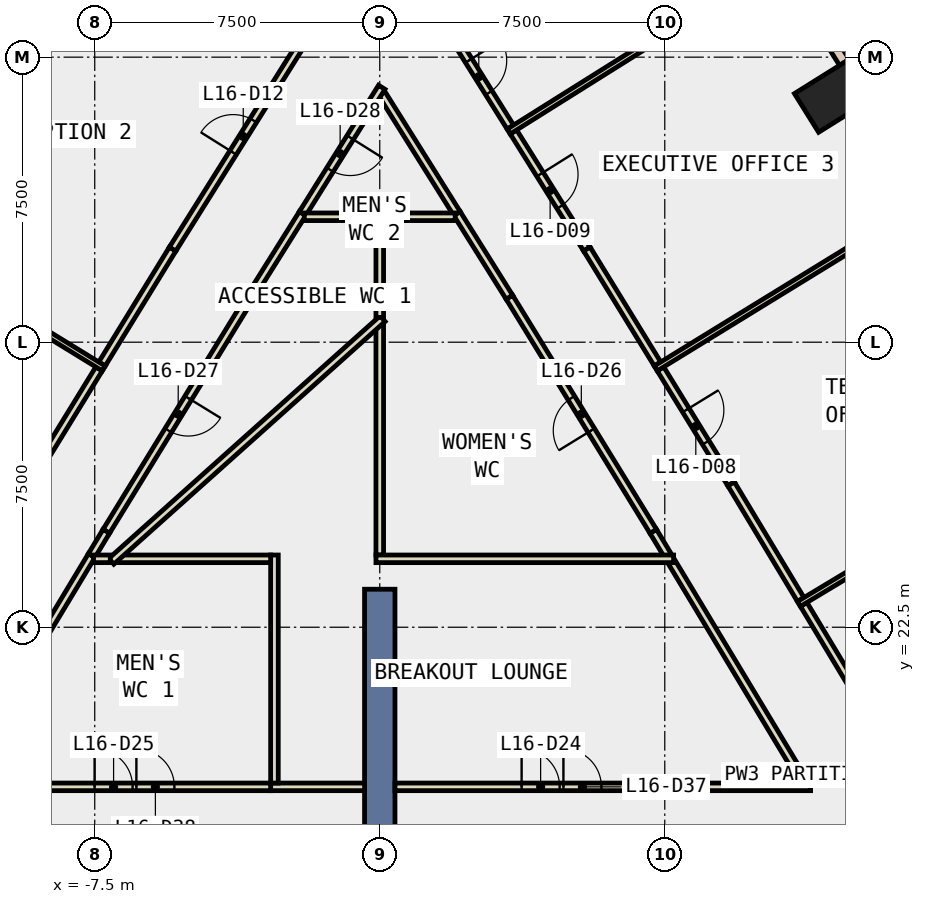
"""IFC4 building model, lengths in metres.
Left out: names, types, materials, properties, quantities, classifications, styles, units other than length and angle.
Written with IfcOpenShell. Run it as: python <this file> out.ifc"""

import sys

from ifc_helpers import new_model, si_unit, direction, frame, frame_2d, origin, origin_2d, place, context, subcontext, project, spatial, rectangle, extrude, element, fill, save


model = new_model("IFC4")
c1 = context("Model", 3, precision=1e-05, world=origin(), true_north=direction((0.0, 1.0)))
c2 = subcontext(c1, "Body", "Model", "MODEL_VIEW")
j1 = project(units=[si_unit("LENGTHUNIT", "METRE"), si_unit("PLANEANGLEUNIT", "RADIAN")], contexts=[c1])
p1 = place(None, origin())
s1 = spatial("IfcSite", under=j1, at=p1, CompositionType="ELEMENT")
p2 = place(p1, origin())
s2 = spatial("IfcBuilding", under=s1, at=p2, CompositionType="ELEMENT")
p3 = place(p2, frame((0.0, 0.0, 77.0)))
s3 = spatial("IfcBuildingStorey", under=s2, at=p3, CompositionType="ELEMENT", Elevation=77.0)
p4 = place(p3, frame((11.909, 36.457, -0.4), z_axis=(0.0, 0.0, 1.0), x_axis=(-0.530067268476, 0.847955594881, 0.0)))
e1 = element("IfcColumn", 1, at=p4, inside=s3, PredefinedType="COLUMN", context=c2, shape_type="SweptSolid", body=[
    extrude(rectangle(XDim=1.2, YDim=1.6, at=origin_2d()), origin(), (0.0, 0.0, 1.0), 4.0),
])
p5 = place(p3, frame((0.0, 14.5, -0.4), z_axis=(0.0, 0.0, 1.0), x_axis=(0.0, 1.0, 0.0)))
e2 = element("IfcWall", 2, at=p5, inside=s3, PredefinedType="SHEAR", context=c2, shape_type="SweptSolid", body=[
    extrude(rectangle(XDim=9.0, YDim=0.8, at=frame_2d((4.5, 0.0))), origin(), (0.0, 0.0, 1.0), 4.0),
])
p6 = place(p3, frame((12.227, 37.362, 0.0), z_axis=(0.0, 0.0, 1.0), x_axis=(-0.531357111884, 0.847147932565, 0.0)))
e3 = element("IfcWall", 3, at=p6, inside=s3, PredefinedType="STANDARD", context=c2, shape_type="SweptSolid", body=[
    extrude(rectangle(XDim=6.282, YDim=0.3, at=frame_2d((3.141, 0.0))), origin(), (0.0, 0.0, 1.0), 3.6),
])
p7 = place(p6, frame((0.571, 0.0, 0.9)))
e4 = element("IfcOpeningElement", 4, at=p7, cuts=e3, PredefinedType="OPENING", context=c2, shape_type="SweptSolid", body=[
    extrude(rectangle(XDim=2.0, YDim=2.6, at=frame_2d((1.0, 1.3))), frame((0.0, 0.16, 0.0), z_axis=(0.0, -1.0, 0.0), x_axis=(1.0, 0.0, 0.0)), (0.0, 0.0, 1.0), 0.32),
])
p8 = place(p6, frame((3.712, 0.0, 0.9)))
e5 = element("IfcOpeningElement", 5, at=p8, cuts=e3, PredefinedType="OPENING", context=c2, shape_type="SweptSolid", body=[
    extrude(rectangle(XDim=2.0, YDim=2.6, at=frame_2d((1.0, 1.3))), frame((0.0, 0.16, 0.0), z_axis=(0.0, -1.0, 0.0), x_axis=(1.0, 0.0, 0.0)), (0.0, 0.0, 1.0), 0.32),
])
p9 = place(p3, frame((11.186, 18.386, 0.0), z_axis=(0.0, 0.0, 1.0), x_axis=(-0.507247363226, 0.861800506208, 0.0)))
e6 = element("IfcWall", 6, at=p9, inside=s3, PredefinedType="PARTITIONING", context=c2, shape_type="SweptSolid", body=[
    extrude(rectangle(XDim=0.516, YDim=0.2, at=frame_2d((0.258, 0.0))), origin(), (0.0, 0.0, 1.0), 3.6),
])
p10 = place(p3, frame((10.924, 18.831, 0.0), z_axis=(0.0, 0.0, 1.0), x_axis=(-0.515797941416, 0.856710268195, 0.0)))
e7 = element("IfcWall", 7, at=p10, inside=s3, PredefinedType="PARTITIONING", context=c2, shape_type="SweptSolid", body=[
    extrude(rectangle(XDim=6.283, YDim=0.2, at=frame_2d((3.142, 0.0))), origin(), (0.0, 0.0, 1.0), 3.6),
])
p11 = place(p3, frame((-7.58, 24.386, 0.0), z_axis=(0.0, 0.0, 1.0), x_axis=(-0.51574664882, -0.85674114774, 0.0)))
e8 = element("IfcWall", 8, at=p11, inside=s3, PredefinedType="PARTITIONING", context=c2, shape_type="SweptSolid", body=[
    extrude(rectangle(XDim=6.484, YDim=0.2, at=frame_2d((3.242, 0.0))), origin(), (0.0, 0.0, 1.0), 3.6),
])
p12 = place(p3, frame((7.58, 24.386, 0.0), z_axis=(0.0, 0.0, 1.0), x_axis=(-0.515748848873, 0.856739823334, 0.0)))
e9 = element("IfcWall", 9, at=p12, inside=s3, PredefinedType="PARTITIONING", context=c2, shape_type="SweptSolid", body=[
    extrude(rectangle(XDim=0.745, YDim=0.2, at=frame_2d((0.372, 0.0))), origin(), (0.0, 0.0, 1.0), 3.6),
])
p13 = place(p3, frame((7.196, 25.024, 0.0), z_axis=(0.0, 0.0, 1.0), x_axis=(-0.523464329994, 0.852047589765, 0.0)))
e10 = element("IfcWall", 10, at=p13, inside=s3, PredefinedType="PARTITIONING", context=c2, shape_type="SweptSolid", body=[
    extrude(rectangle(XDim=7.231, YDim=0.2, at=frame_2d((3.615, 0.0))), origin(), (0.0, 0.0, 1.0), 3.6),
])
p14 = place(p13, frame((3.115, 0.0, 0.0)))
e11 = element("IfcOpeningElement", 11, at=p14, cuts=e10, PredefinedType="OPENING", context=c2, shape_type="SweptSolid", body=[
    extrude(rectangle(XDim=1.0, YDim=2.1, at=frame_2d((0.5, 1.05))), frame((0.0, 0.11, 0.0), z_axis=(0.0, -1.0, 0.0), x_axis=(1.0, 0.0, 0.0)), (0.0, 0.0, 1.0), 0.22),
])
for number, where, z_axis, x_axis in (
    (12, (3.411, 31.185, 0.0), (0.0, 0.0, 1.0), (-0.531, 0.847, 0.0)),
    (13, (-2.031, 33.385, 0.0), (0.0, 0.0, 1.0), (-0.531, -0.847, 0.0)),
):
    element("IfcWall", number, at=place(p3, frame(where, z_axis=z_axis, x_axis=x_axis)), inside=s3, PredefinedType="PARTITIONING", context=c2, shape_type="SweptSolid", body=[
        extrude(rectangle(XDim=2.597, YDim=0.2, at=frame_2d((1.298, 0.0))), origin(), (0.0, 0.0, 1.0), 3.6),
    ])
p15 = place(p3, frame((-3.411, 31.185, 0.0), z_axis=(0.0, 0.0, 1.0), x_axis=(-0.523464329994, -0.852047589765, 0.0)))
e14 = element("IfcWall", 14, at=p15, inside=s3, PredefinedType="PARTITIONING", context=c2, shape_type="SweptSolid", body=[
    extrude(rectangle(XDim=7.231, YDim=0.2, at=frame_2d((3.615, 0.0))), origin(), (0.0, 0.0, 1.0), 3.6),
])
p16 = place(p15, frame((3.115, 0.0, 0.0)))
e15 = element("IfcOpeningElement", 15, at=p16, cuts=e14, PredefinedType="OPENING", context=c2, shape_type="SweptSolid", body=[
    extrude(rectangle(XDim=1.0, YDim=2.1, at=frame_2d((0.5, 1.05))), frame((0.0, 0.11, 0.0), z_axis=(0.0, -1.0, 0.0), x_axis=(1.0, 0.0, 0.0)), (0.0, 0.0, 1.0), 0.22),
])
p17 = place(p3, frame((-7.196, 25.024, 0.0), z_axis=(0.0, 0.0, 1.0), x_axis=(-0.515748848873, -0.856739823334, 0.0)))
e16 = element("IfcWall", 16, at=p17, inside=s3, PredefinedType="PARTITIONING", context=c2, shape_type="SweptSolid", body=[
    extrude(rectangle(XDim=0.745, YDim=0.2, at=frame_2d((0.372, 0.0))), origin(), (0.0, 0.0, 1.0), 3.6),
])
p18 = place(p3, frame((2.031, 33.385, 0.0), z_axis=(0.0, 0.0, 1.0), x_axis=(-0.53130100335, 0.847183122967, 0.0)))
e17 = element("IfcWall", 17, at=p18, inside=s3, PredefinedType="PARTITIONING", context=c2, shape_type="SweptSolid", body=[
    extrude(rectangle(XDim=3.723, YDim=0.2, at=frame_2d((1.861, 0.0))), origin(), (0.0, 0.0, 1.0), 3.6),
])
p19 = place(p3, frame((0.053, 36.708, 0.0), z_axis=(0.0, 0.0, 1.0), x_axis=(-0.53130190932, -0.847182554797, 0.0)))
e18 = element("IfcWall", 18, at=p19, inside=s3, PredefinedType="PARTITIONING", context=c2, shape_type="SweptSolid", body=[
    extrude(rectangle(XDim=3.922, YDim=0.2, at=frame_2d((1.961, 0.0))), origin(), (0.0, 0.0, 1.0), 3.6),
])
p20 = place(p19, frame((1.562, 0.0, 0.0)))
e19 = element("IfcOpeningElement", 19, at=p20, cuts=e18, PredefinedType="OPENING", context=c2, shape_type="SweptSolid", body=[
    extrude(rectangle(XDim=1.0, YDim=2.1, at=frame_2d((0.5, 1.05))), frame((0.0, 0.11, 0.0), z_axis=(0.0, -1.0, 0.0), x_axis=(1.0, 0.0, 0.0)), (0.0, 0.0, 1.0), 0.22),
])
p21 = place(p3, frame((11.156, 23.1, 0.0), z_axis=(0.0, 0.0, 1.0), x_axis=(0.515628270719, -0.856812398623, 0.0)))
e20 = element("IfcWall", 20, at=p21, inside=s3, PredefinedType="PARTITIONING", context=c2, shape_type="SweptSolid", body=[
    extrude(rectangle(XDim=3.549, YDim=0.2, at=frame_2d((1.775, 0.0))), origin(), (0.0, 0.0, 1.0), 3.6),
])
p22 = place(p3, frame((7.387, 29.298, 0.0), z_axis=(0.0, 0.0, 1.0), x_axis=(0.523341833043, -0.852122834917, 0.0)))
e21 = element("IfcWall", 21, at=p22, inside=s3, PredefinedType="PARTITIONING", context=c2, shape_type="SweptSolid", body=[
    extrude(rectangle(XDim=3.552, YDim=0.2, at=frame_2d((1.776, 0.0))), origin(), (0.0, 0.0, 1.0), 3.6),
])
p23 = place(p22, frame((1.276, 0.0, 0.0)))
e22 = element("IfcOpeningElement", 22, at=p23, cuts=e21, PredefinedType="OPENING", context=c2, shape_type="SweptSolid", body=[
    extrude(rectangle(XDim=1.0, YDim=2.1, at=frame_2d((0.5, 1.05))), frame((0.0, 0.11, 0.0), z_axis=(0.0, -1.0, 0.0), x_axis=(1.0, 0.0, 0.0)), (0.0, 0.0, 1.0), 0.22),
])
p24 = place(p3, frame((9.246, 26.271, 0.0), z_axis=(0.0, 0.0, 1.0), x_axis=(0.515738557296, -0.856746018677, 0.0)))
e23 = element("IfcWall", 23, at=p24, inside=s3, PredefinedType="PARTITIONING", context=c2, shape_type="SweptSolid", body=[
    extrude(rectangle(XDim=3.552, YDim=0.2, at=frame_2d((1.776, 0.0))), origin(), (0.0, 0.0, 1.0), 3.6),
])
p25 = place(p3, frame((3.517, 35.533, 0.0), z_axis=(0.0, 0.0, 1.0), x_axis=(0.531301282969, -0.847182947607, 0.0)))
e24 = element("IfcWall", 24, at=p25, inside=s3, PredefinedType="PARTITIONING", context=c2, shape_type="SweptSolid", body=[
    extrude(rectangle(XDim=3.638, YDim=0.2, at=frame_2d((1.819, 0.0))), origin(), (0.0, 0.0, 1.0), 3.6),
])
p26 = place(p25, frame((1.319, 0.0, 0.0)))
e25 = element("IfcOpeningElement", 25, at=p26, cuts=e24, PredefinedType="OPENING", context=c2, shape_type="SweptSolid", body=[
    extrude(rectangle(XDim=1.0, YDim=2.1, at=frame_2d((0.5, 1.05))), frame((0.0, 0.11, 0.0), z_axis=(0.0, -1.0, 0.0), x_axis=(1.0, 0.0, 0.0)), (0.0, 0.0, 1.0), 0.22),
])
p27 = place(p3, frame((5.45, 32.451, 0.0), z_axis=(0.0, 0.0, 1.0), x_axis=(0.523617783711, -0.851953294836, 0.0)))
e26 = element("IfcWall", 26, at=p27, inside=s3, PredefinedType="PARTITIONING", context=c2, shape_type="SweptSolid", body=[
    extrude(rectangle(XDim=3.551, YDim=0.2, at=frame_2d((1.775, 0.0))), origin(), (0.0, 0.0, 1.0), 3.6),
])
p28 = place(p3, frame((1.775, 38.31, 0.0), z_axis=(0.0, 0.0, 1.0), x_axis=(0.531324164807, -0.847168597088, 0.0)))
e27 = element("IfcWall", 27, at=p28, inside=s3, PredefinedType="PARTITIONING", context=c2, shape_type="SweptSolid", body=[
    extrude(rectangle(XDim=3.128, YDim=0.2, at=frame_2d((1.564, 0.0))), origin(), (0.0, 0.0, 1.0), 3.6),
])
p29 = place(p28, frame((1.064, 0.0, 0.0)))
e28 = element("IfcOpeningElement", 28, at=p29, cuts=e27, PredefinedType="OPENING", context=c2, shape_type="SweptSolid", body=[
    extrude(rectangle(XDim=1.0, YDim=2.1, at=frame_2d((0.5, 1.05))), frame((0.0, 0.11, 0.0), z_axis=(0.0, -1.0, 0.0), x_axis=(1.0, 0.0, 0.0)), (0.0, 0.0, 1.0), 0.22),
])
p30 = place(p3, frame((-7.309, 29.426, 0.0), z_axis=(0.0, 0.0, 1.0), x_axis=(0.523617783711, 0.851953294836, 0.0)))
e29 = element("IfcWall", 29, at=p30, inside=s3, PredefinedType="PARTITIONING", context=c2, shape_type="SweptSolid", body=[
    extrude(rectangle(XDim=3.551, YDim=0.2, at=frame_2d((1.775, 0.0))), origin(), (0.0, 0.0, 1.0), 3.6),
])
p31 = place(p3, frame((-5.45, 32.451, 0.0), z_axis=(0.0, 0.0, 1.0), x_axis=(0.531388870359, 0.847128011849, 0.0)))
e30 = element("IfcWall", 30, at=p31, inside=s3, PredefinedType="PARTITIONING", context=c2, shape_type="SweptSolid", body=[
    extrude(rectangle(XDim=6.991, YDim=0.2, at=frame_2d((3.495, 0.0))), origin(), (0.0, 0.0, 1.0), 3.6),
])
p32 = place(p31, frame((2.996, 0.0, 0.0)))
e31 = element("IfcOpeningElement", 31, at=p32, cuts=e30, PredefinedType="OPENING", context=c2, shape_type="SweptSolid", body=[
    extrude(rectangle(XDim=1.0, YDim=2.1, at=frame_2d((0.5, 1.05))), frame((0.0, 0.11, 0.0), z_axis=(0.0, -1.0, 0.0), x_axis=(1.0, 0.0, 0.0)), (0.0, 0.0, 1.0), 0.22),
])
p33 = place(p3, frame((-9.246, 26.271, 0.0), z_axis=(0.0, 0.0, 1.0), x_axis=(0.523341833043, 0.852122834917, 0.0)))
e32 = element("IfcWall", 32, at=p33, inside=s3, PredefinedType="PARTITIONING", context=c2, shape_type="SweptSolid", body=[
    extrude(rectangle(XDim=3.552, YDim=0.2, at=frame_2d((1.776, 0.0))), origin(), (0.0, 0.0, 1.0), 3.6),
])
p34 = place(p3, frame((-2.871, 18.3, 0.0), z_axis=(0.0, 0.0, 1.0), x_axis=(1.0, 0.0, 0.0)))
e33 = element("IfcWall", 33, at=p34, inside=s3, PredefinedType="PARTITIONING", context=c2, shape_type="SweptSolid", body=[
    extrude(rectangle(XDim=2.471, YDim=0.2, at=frame_2d((1.236, 0.0))), origin(), (0.0, 0.0, 1.0), 3.6),
])
p35 = place(p3, frame((-11.337, 18.3, 0.0), z_axis=(0.0, 0.0, 1.0), x_axis=(1.0, 0.0, 0.0)))
e34 = element("IfcWall", 34, at=p35, inside=s3, PredefinedType="PARTITIONING", context=c2, shape_type="SweptSolid", body=[
    extrude(rectangle(XDim=8.466, YDim=0.2, at=frame_2d((4.233, 0.0))), origin(), (0.0, 0.0, 1.0), 3.6),
])
p36 = place(p35, frame((3.833, 0.0, 0.0)))
e35 = element("IfcOpeningElement", 35, at=p36, cuts=e34, PredefinedType="OPENING", context=c2, shape_type="SweptSolid", body=[
    extrude(rectangle(XDim=1.0, YDim=2.1, at=frame_2d((0.5, 1.05))), frame((0.0, 0.11, 0.0), z_axis=(0.0, -1.0, 0.0), x_axis=(1.0, 0.0, 0.0)), (0.0, 0.0, 1.0), 0.22),
])
p37 = place(p35, frame((4.933, 0.0, 0.0)))
e36 = element("IfcOpeningElement", 36, at=p37, cuts=e34, PredefinedType="OPENING", context=c2, shape_type="SweptSolid", body=[
    extrude(rectangle(XDim=1.0, YDim=2.1, at=frame_2d((0.5, 1.05))), frame((0.0, 0.11, 0.0), z_axis=(0.0, -1.0, 0.0), x_axis=(1.0, 0.0, 0.0)), (0.0, 0.0, 1.0), 0.22),
])
p38 = place(p3, frame((-2.771, 18.4, 0.0), z_axis=(0.0, 0.0, 1.0), x_axis=(0.0, 1.0, 0.0)))
e37 = element("IfcWall", 37, at=p38, inside=s3, PredefinedType="PARTITIONING", context=c2, shape_type="SweptSolid", body=[
    extrude(rectangle(XDim=6.0, YDim=0.2, at=frame_2d((3.0, 0.0))), origin(), (0.0, 0.0, 1.0), 3.6),
])
p39 = place(p3, frame((-2.871, 24.3, 0.0), z_axis=(0.0, 0.0, 1.0), x_axis=(-1.0, 0.0, 0.0)))
e38 = element("IfcWall", 38, at=p39, inside=s3, PredefinedType="PARTITIONING", context=c2, shape_type="SweptSolid", body=[
    extrude(rectangle(XDim=4.02, YDim=0.2, at=frame_2d((2.01, 0.0))), origin(), (0.0, 0.0, 1.0), 3.6),
])
p40 = place(p3, frame((0.0, 30.452, 0.0), z_axis=(0.0, 0.0, 1.0), x_axis=(0.0, -1.0, 0.0)))
e39 = element("IfcWall", 39, at=p40, inside=s3, PredefinedType="PARTITIONING", context=c2, shape_type="SweptSolid", body=[
    extrude(rectangle(XDim=6.052, YDim=0.2, at=frame_2d((3.026, 0.0))), origin(), (0.0, 0.0, 1.0), 3.6),
])
p41 = place(p3, frame((-0.1, 24.3, 0.0), z_axis=(0.0, 0.0, 1.0), x_axis=(1.0, 0.0, 0.0)))
e40 = element("IfcWall", 40, at=p41, inside=s3, PredefinedType="PARTITIONING", context=c2, shape_type="SweptSolid", body=[
    extrude(rectangle(XDim=7.832, YDim=0.2, at=frame_2d((3.916, 0.0))), origin(), (0.0, 0.0, 1.0), 3.6),
])
p42 = place(p3, frame((-7.065, 24.233, 0.0), z_axis=(0.0, 0.0, 1.0), x_axis=(0.745362618546, 0.666659258448, 0.0)))
e41 = element("IfcWall", 41, at=p42, inside=s3, PredefinedType="PARTITIONING", context=c2, shape_type="SweptSolid", body=[
    extrude(rectangle(XDim=9.579, YDim=0.2, at=frame_2d((4.79, 0.0))), origin(), (0.0, 0.0, 1.0), 3.6),
])
p43 = place(p3, frame((-7.532, 24.3, 0.0), z_axis=(0.0, 0.0, 1.0), x_axis=(1.0, 0.0, 0.0)))
e42 = element("IfcWall", 42, at=p43, inside=s3, PredefinedType="PARTITIONING", context=c2, shape_type="SweptSolid", body=[
    extrude(rectangle(XDim=0.441, YDim=0.2, at=frame_2d((0.22, 0.0))), origin(), (0.0, 0.0, 1.0), 3.6),
])
p44 = place(p3, frame((0.0, 30.652, 0.0), z_axis=(0.0, 0.0, 1.0), x_axis=(0.0, 1.0, 0.0)))
e43 = element("IfcWall", 43, at=p44, inside=s3, PredefinedType="PARTITIONING", context=c2, shape_type="SweptSolid", body=[
    extrude(rectangle(XDim=2.748, YDim=0.2, at=frame_2d((1.374, 0.0))), origin(), (0.0, 0.0, 1.0), 3.6),
])
for number, where, z_axis, x_axis in (
    (44, (0.1, 33.3, 0.0), (0.0, 0.0, 1.0), (1.0, 0.0, 0.0)),
    (45, (-1.985, 33.3, 0.0), (0.0, 0.0, 1.0), (1.0, 0.0, 0.0)),
):
    element("IfcWall", number, at=place(p3, frame(where, z_axis=z_axis, x_axis=x_axis)), inside=s3, PredefinedType="PARTITIONING", context=c2, shape_type="SweptSolid", body=[
        extrude(rectangle(XDim=1.885, YDim=0.2, at=frame_2d((0.942, 0.0))), origin(), (0.0, 0.0, 1.0), 3.6),
    ])
p45 = place(p3, frame((11.031, 23.113, 0.0), z_axis=(0.0, 0.0, 1.0), x_axis=(0.856780947164, 0.515680529568, 0.0)))
e46 = element("IfcWall", 46, at=p45, inside=s3, PredefinedType="PARTITIONING", context=c2, shape_type="SweptSolid", body=[
    extrude(rectangle(XDim=8.3, YDim=0.15, at=frame_2d((4.15, 0.0))), origin(), (0.0, 0.0, 1.0), 3.6),
])
p46 = place(p3, frame((7.263, 29.31, 0.0), z_axis=(0.0, 0.0, 1.0), x_axis=(0.85208929269, 0.523396443706, 0.0)))
e47 = element("IfcWall", 47, at=p46, inside=s3, PredefinedType="PARTITIONING", context=c2, shape_type="SweptSolid", body=[
    extrude(rectangle(XDim=8.3, YDim=0.15, at=frame_2d((4.15, 0.0))), origin(), (0.0, 0.0, 1.0), 3.6),
])
p47 = place(p3, frame((3.393, 35.543, 0.0), z_axis=(0.0, 0.0, 1.0), x_axis=(0.847089858839, 0.531449688166, 0.0)))
e48 = element("IfcWall", 48, at=p47, inside=s3, PredefinedType="PARTITIONING", context=c2, shape_type="SweptSolid", body=[
    extrude(rectangle(XDim=8.3, YDim=0.15, at=frame_2d((4.15, 0.0))), origin(), (0.0, 0.0, 1.0), 3.6),
])
p48 = place(p3, frame((-7.263, 29.31, 0.0), z_axis=(0.0, 0.0, 1.0), x_axis=(-0.85208929269, 0.523396443706, 0.0)))
e49 = element("IfcWall", 49, at=p48, inside=s3, PredefinedType="PARTITIONING", context=c2, shape_type="SweptSolid", body=[
    extrude(rectangle(XDim=8.3, YDim=0.15, at=frame_2d((4.15, 0.0))), origin(), (0.0, 0.0, 1.0), 3.6),
])
p49 = place(p3, frame((0.4, 18.3, 0.0), z_axis=(0.0, 0.0, 1.0), x_axis=(1.0, 0.0, 0.0)))
e50 = element("IfcWall", 50, at=p49, inside=s3, PredefinedType="PARTITIONING", context=c2, shape_type="SweptSolid", body=[
    extrude(rectangle(XDim=10.937, YDim=0.2, at=frame_2d((5.469, 0.0))), origin(), (0.0, 0.0, 1.0), 3.6),
])
p50 = place(p49, frame((3.333, 0.0, 0.0)))
e51 = element("IfcOpeningElement", 51, at=p50, cuts=e50, PredefinedType="OPENING", context=c2, shape_type="SweptSolid", body=[
    extrude(rectangle(XDim=1.0, YDim=2.1, at=frame_2d((0.5, 1.05))), frame((0.0, 0.11, 0.0), z_axis=(0.0, -1.0, 0.0), x_axis=(1.0, 0.0, 0.0)), (0.0, 0.0, 1.0), 0.22),
])
p51 = place(p49, frame((4.433, 0.0, 0.0)))
e52 = element("IfcOpeningElement", 52, at=p51, cuts=e50, PredefinedType="OPENING", context=c2, shape_type="SweptSolid", body=[
    extrude(rectangle(XDim=1.0, YDim=2.1, at=frame_2d((0.5, 1.05))), frame((0.0, 0.11, 0.0), z_axis=(0.0, -1.0, 0.0), x_axis=(1.0, 0.0, 0.0)), (0.0, 0.0, 1.0), 0.22),
])
p52 = place(p23, origin())
e53 = element("IfcDoor", 53, at=p52, inside=s3, OperationType="SINGLE_SWING_RIGHT", PredefinedType="DOOR", context=c2, shape_type="SweptSolid", body=[
    extrude(rectangle(XDim=1.0, YDim=2.1, at=frame_2d((0.5, 1.05))), frame((0.0, 0.025, 0.0), z_axis=(0.0, -1.0, 0.0), x_axis=(1.0, 0.0, 0.0)), (0.0, 0.0, 1.0), 0.05),
])
fill(e22, e53)
p53 = place(p26, origin())
e54 = element("IfcDoor", 54, at=p53, inside=s3, OperationType="SINGLE_SWING_LEFT", PredefinedType="DOOR", context=c2, shape_type="SweptSolid", body=[
    extrude(rectangle(XDim=1.0, YDim=2.1, at=frame_2d((0.5, 1.05))), frame((0.0, 0.025, 0.0), z_axis=(0.0, -1.0, 0.0), x_axis=(1.0, 0.0, 0.0)), (0.0, 0.0, 1.0), 0.05),
])
fill(e25, e54)
p54 = place(p29, origin())
e55 = element("IfcDoor", 55, at=p54, inside=s3, OperationType="SINGLE_SWING_LEFT", PredefinedType="DOOR", context=c2, shape_type="SweptSolid", body=[
    extrude(rectangle(XDim=1.0, YDim=2.1, at=frame_2d((0.5, 1.05))), frame((0.0, 0.025, 0.0), z_axis=(0.0, -1.0, 0.0), x_axis=(1.0, 0.0, 0.0)), (0.0, 0.0, 1.0), 0.05),
])
fill(e28, e55)
p55 = place(p32, origin())
e56 = element("IfcDoor", 56, at=p55, inside=s3, OperationType="SINGLE_SWING_LEFT", PredefinedType="DOOR", context=c2, shape_type="SweptSolid", body=[
    extrude(rectangle(XDim=1.0, YDim=2.1, at=frame_2d((0.5, 1.05))), frame((0.0, 0.025, 0.0), z_axis=(0.0, -1.0, 0.0), x_axis=(1.0, 0.0, 0.0)), (0.0, 0.0, 1.0), 0.05),
])
fill(e31, e56)
p56 = place(p50, origin())
e57 = element("IfcDoor", 57, at=p56, inside=s3, OperationType="SINGLE_SWING_LEFT", PredefinedType="DOOR", context=c2, shape_type="SweptSolid", body=[
    extrude(rectangle(XDim=1.0, YDim=2.1, at=frame_2d((0.5, 1.05))), frame((0.0, 0.025, 0.0), z_axis=(0.0, -1.0, 0.0), x_axis=(1.0, 0.0, 0.0)), (0.0, 0.0, 1.0), 0.05),
])
fill(e51, e57)
p57 = place(p36, origin())
e58 = element("IfcDoor", 58, at=p57, inside=s3, OperationType="SINGLE_SWING_RIGHT", PredefinedType="DOOR", context=c2, shape_type="SweptSolid", body=[
    extrude(rectangle(XDim=1.0, YDim=2.1, at=frame_2d((0.5, 1.05))), frame((0.0, 0.025, 0.0), z_axis=(0.0, -1.0, 0.0), x_axis=(1.0, 0.0, 0.0)), (0.0, 0.0, 1.0), 0.05),
])
fill(e35, e58)
p58 = place(p14, origin())
e59 = element("IfcDoor", 59, at=p58, inside=s3, OperationType="SINGLE_SWING_LEFT", PredefinedType="DOOR", context=c2, shape_type="SweptSolid", body=[
    extrude(rectangle(XDim=1.0, YDim=2.1, at=frame_2d((0.5, 1.05))), frame((0.0, 0.025, 0.0), z_axis=(0.0, -1.0, 0.0), x_axis=(1.0, 0.0, 0.0)), (0.0, 0.0, 1.0), 0.05),
])
fill(e11, e59)
p59 = place(p16, origin())
e60 = element("IfcDoor", 60, at=p59, inside=s3, OperationType="SINGLE_SWING_LEFT", PredefinedType="DOOR", context=c2, shape_type="SweptSolid", body=[
    extrude(rectangle(XDim=1.0, YDim=2.1, at=frame_2d((0.5, 1.05))), frame((0.0, 0.025, 0.0), z_axis=(0.0, -1.0, 0.0), x_axis=(1.0, 0.0, 0.0)), (0.0, 0.0, 1.0), 0.05),
])
fill(e15, e60)
p60 = place(p20, origin())
e61 = element("IfcDoor", 61, at=p60, inside=s3, OperationType="SINGLE_SWING_LEFT", PredefinedType="DOOR", context=c2, shape_type="SweptSolid", body=[
    extrude(rectangle(XDim=1.0, YDim=2.1, at=frame_2d((0.5, 1.05))), frame((0.0, 0.025, 0.0), z_axis=(0.0, -1.0, 0.0), x_axis=(1.0, 0.0, 0.0)), (0.0, 0.0, 1.0), 0.05),
])
fill(e19, e61)
p61 = place(p51, origin())
e62 = element("IfcDoor", 62, at=p61, inside=s3, OperationType="SINGLE_SWING_RIGHT", PredefinedType="DOOR", context=c2, shape_type="SweptSolid", body=[
    extrude(rectangle(XDim=1.0, YDim=2.1, at=frame_2d((0.5, 1.05))), frame((0.0, 0.025, 0.0), z_axis=(0.0, -1.0, 0.0), x_axis=(1.0, 0.0, 0.0)), (0.0, 0.0, 1.0), 0.05),
])
fill(e52, e62)
p62 = place(p37, origin())
e63 = element("IfcDoor", 63, at=p62, inside=s3, OperationType="SINGLE_SWING_RIGHT", PredefinedType="DOOR", context=c2, shape_type="SweptSolid", body=[
    extrude(rectangle(XDim=1.0, YDim=2.1, at=frame_2d((0.5, 1.05))), frame((0.0, 0.025, 0.0), z_axis=(0.0, -1.0, 0.0), x_axis=(1.0, 0.0, 0.0)), (0.0, 0.0, 1.0), 0.05),
])
fill(e36, e63)
save(model, sys.argv[1])
